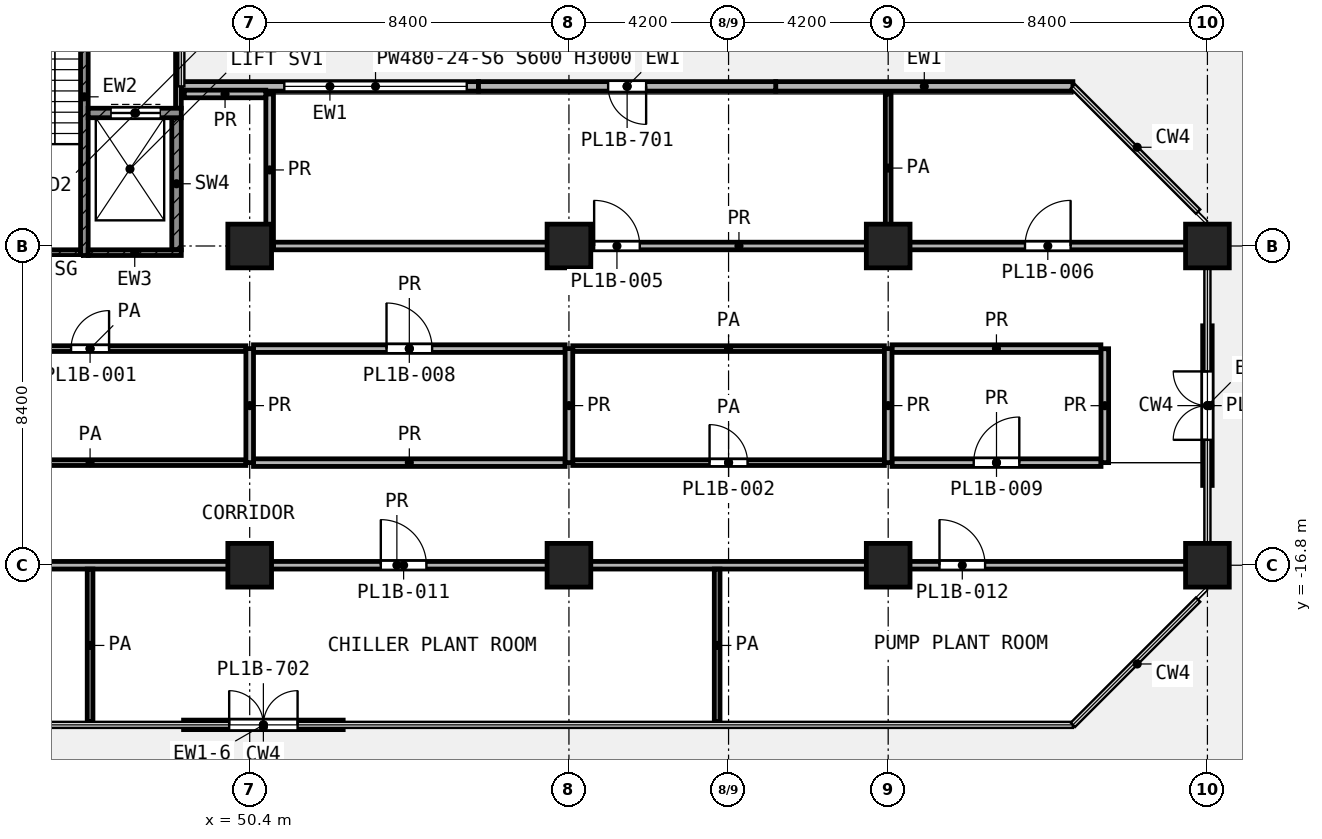
"""IFC4 building model, lengths in metres.
Left out: names, types, materials, properties, quantities, classifications, styles, units other than length and angle.
Written with IfcOpenShell. Run it as: python <this file> out.ifc"""

import sys

from ifc_helpers import new_model, si_unit, direction, frame, frame_2d, origin, origin_2d, place, context, subcontext, project, spatial, rectangle, extrude, element, fill, save


model = new_model("IFC4")
c1 = context("Model", 3, precision=1e-05, world=origin(), true_north=direction((0.0, 1.0)))
c2 = subcontext(c1, "Body", "Model", "MODEL_VIEW")
j1 = project(units=[si_unit("LENGTHUNIT", "METRE"), si_unit("PLANEANGLEUNIT", "RADIAN")], contexts=[c1])
p1 = place(None, origin())
s1 = spatial("IfcSite", under=j1, at=p1, CompositionType="ELEMENT")
p2 = place(p1, origin())
s2 = spatial("IfcBuilding", under=s1, at=p2, CompositionType="ELEMENT")
p3 = place(p2, frame((0.0, 0.0, 93.8)))
s3 = spatial("IfcBuildingStorey", under=s2, at=p3, CompositionType="ELEMENT", Elevation=93.8)
for number, where, z_axis, x_axis in (
    (1, (50.4, -8.4, 0.0), (0.0, 0.0, 1.0), (1.0, 0.0, 0.0)),
    (2, (58.8, -8.4, 0.0), (0.0, 0.0, 1.0), (1.0, 0.0, 0.0)),
    (3, (67.2, -8.4, 0.0), (0.0, 0.0, 1.0), (1.0, 0.0, 0.0)),
    (4, (75.6, -8.4, 0.0), (0.0, 0.0, 1.0), (1.0, 0.0, 0.0)),
    (5, (50.4, -16.8, 0.0), (0.0, 0.0, 1.0), (1.0, 0.0, 0.0)),
    (6, (58.8, -16.8, 0.0), (0.0, 0.0, 1.0), (1.0, 0.0, 0.0)),
    (7, (67.2, -16.8, 0.0), (0.0, 0.0, 1.0), (1.0, 0.0, 0.0)),
    (8, (75.6, -16.8, 0.0), (0.0, 0.0, 1.0), (1.0, 0.0, 0.0)),
):
    element("IfcColumn", number, at=place(p3, frame(where, z_axis=z_axis, x_axis=x_axis)), inside=s3, PredefinedType="COLUMN", context=c2, shape_type="SweptSolid", body=[
        extrude(rectangle(XDim=1.15, YDim=1.15, at=origin_2d()), origin(), (0.0, 0.0, 1.0), 5.0),
    ])
p4 = place(p3, frame((48.66, -21.0, 0.0), z_axis=(0.0, 0.0, 1.0), x_axis=(1.0, 0.0, 0.0)))
e9 = element("IfcWall", 9, at=p4, inside=s3, PredefinedType="SOLIDWALL", context=c2, shape_type="SweptSolid", body=[
    extrude(rectangle(XDim=4.2, YDim=0.25, at=frame_2d((2.1, 0.0))), origin(), (0.0, 0.0, 1.0), 4.24),
])
p5 = place(p4, frame((1.2, 0.0, 0.0)))
e10 = element("IfcOpeningElement", 10, at=p5, cuts=e9, PredefinedType="OPENING", context=c2, shape_type="SweptSolid", body=[
    extrude(rectangle(XDim=1.8, YDim=2.1, at=frame_2d((0.9, 1.05))), frame((0.0, 0.135, 0.0), z_axis=(0.0, -1.0, 0.0), x_axis=(1.0, 0.0, 0.0)), (0.0, 0.0, 1.0), 0.27),
])
p6 = place(p3, frame((75.6, -14.7, 0.0), z_axis=(0.0, 0.0, 1.0), x_axis=(0.0, 1.0, 0.0)))
e11 = element("IfcWall", 11, at=p6, inside=s3, PredefinedType="SOLIDWALL", context=c2, shape_type="SweptSolid", body=[
    extrude(rectangle(XDim=4.2, YDim=0.25, at=frame_2d((2.1, 0.0))), origin(), (0.0, 0.0, 1.0), 4.24),
])
p7 = place(p6, frame((1.2, 0.0, 0.0)))
e12 = element("IfcOpeningElement", 12, at=p7, cuts=e11, PredefinedType="OPENING", context=c2, shape_type="SweptSolid", body=[
    extrude(rectangle(XDim=1.8, YDim=2.1, at=frame_2d((0.9, 1.05))), frame((0.0, 0.135, 0.0), z_axis=(0.0, -1.0, 0.0), x_axis=(1.0, 0.0, 0.0)), (0.0, 0.0, 1.0), 0.27),
])
p8 = place(p3, frame((72.06, -4.2, 0.0), z_axis=(0.0, 0.0, 1.0), x_axis=(-1.0, 0.0, 0.0)))
e13 = element("IfcWall", 13, at=p8, inside=s3, PredefinedType="SOLIDWALL", context=c2, shape_type="SweptSolid", body=[
    extrude(rectangle(XDim=7.82, YDim=0.25, at=frame_2d((3.91, 0.0))), origin(), (0.0, 0.0, 1.0), 4.4),
])
p9 = place(p3, frame((64.24, -4.2, 0.0), z_axis=(0.0, 0.0, 1.0), x_axis=(-1.0, 0.0, 0.0)))
e14 = element("IfcWall", 14, at=p9, inside=s3, PredefinedType="SOLIDWALL", context=c2, shape_type="SweptSolid", body=[
    extrude(rectangle(XDim=7.82, YDim=0.25, at=frame_2d((3.91, 0.0))), origin(), (0.0, 0.0, 1.0), 4.4),
])
p10 = place(p9, frame((3.409, 0.0, 0.0)))
e15 = element("IfcOpeningElement", 15, at=p10, cuts=e14, PredefinedType="OPENING", context=c2, shape_type="SweptSolid", body=[
    extrude(rectangle(XDim=1.0, YDim=2.1, at=frame_2d((0.5, 1.05))), frame((0.0, 0.135, 0.0), z_axis=(0.0, -1.0, 0.0), x_axis=(1.0, 0.0, 0.0)), (0.0, 0.0, 1.0), 0.27),
])
p11 = place(p3, frame((56.421, -4.2, 0.0), z_axis=(0.0, 0.0, 1.0), x_axis=(-1.0, 0.0, 0.0)))
e16 = element("IfcWall", 16, at=p11, inside=s3, PredefinedType="SOLIDWALL", context=c2, shape_type="SweptSolid", body=[
    extrude(rectangle(XDim=7.82, YDim=0.25, at=frame_2d((3.91, 0.0))), origin(), (0.0, 0.0, 1.0), 4.4),
])
p12 = place(p11, frame((0.31, 0.0, 0.6)))
e17 = element("IfcOpeningElement", 17, at=p12, cuts=e16, PredefinedType="OPENING", context=c2, shape_type="SweptSolid", body=[
    extrude(rectangle(XDim=4.8, YDim=2.4, at=frame_2d((2.4, 1.2))), frame((0.0, 0.135, 0.0), z_axis=(0.0, -1.0, 0.0), x_axis=(1.0, 0.0, 0.0)), (0.0, 0.0, 1.0), 0.27),
])
p13 = place(p3, frame((46.05, -8.65, 0.0), z_axis=(0.0, 0.0, 1.0), x_axis=(0.0, 1.0, 0.0)))
e18 = element("IfcWall", 18, at=p13, inside=s3, PredefinedType="SHEAR", context=c2, shape_type="SweptSolid", body=[
    extrude(rectangle(XDim=8.35, YDim=0.2, at=frame_2d((4.175, 0.0))), origin(), (0.0, 0.0, 1.0), 4.4),
])
p14 = place(p13, frame((7.0, 0.0, 0.0)))
e19 = element("IfcOpeningElement", 19, at=p14, cuts=e18, PredefinedType="OPENING", context=c2, shape_type="SweptSolid", body=[
    extrude(rectangle(XDim=1.1, YDim=2.1, at=frame_2d((0.55, 1.05))), frame((0.0, 0.11, 0.0), z_axis=(0.0, -1.0, 0.0), x_axis=(1.0, 0.0, 0.0)), (0.0, 0.0, 1.0), 0.22),
])
p15 = place(p3, frame((43.1, -8.575, 0.0), z_axis=(0.0, 0.0, 1.0), x_axis=(1.0, 0.0, 0.0)))
e20 = element("IfcWall", 20, at=p15, inside=s3, PredefinedType="SHEAR", context=c2, shape_type="SweptSolid", body=[
    extrude(rectangle(XDim=2.85, YDim=0.15, at=frame_2d((1.425, 0.0))), origin(), (0.0, 0.0, 1.0), 4.4),
])
p16 = place(p3, frame((46.15, -8.575, 0.0), z_axis=(0.0, 0.0, 1.0), x_axis=(1.0, 0.0, 0.0)))
e21 = element("IfcWall", 21, at=p16, inside=s3, PredefinedType="SHEAR", context=c2, shape_type="SweptSolid", body=[
    extrude(rectangle(XDim=2.45, YDim=0.15, at=frame_2d((1.225, 0.0))), origin(), (0.0, 0.0, 1.0), 4.4),
])
p17 = place(p3, frame((46.15, -4.9, 0.0), z_axis=(0.0, 0.0, 1.0), x_axis=(1.0, 0.0, 0.0)))
e22 = element("IfcWall", 22, at=p17, inside=s3, PredefinedType="SHEAR", context=c2, shape_type="SweptSolid", body=[
    extrude(rectangle(XDim=2.45, YDim=0.25, at=frame_2d((1.225, 0.0))), origin(), (0.0, 0.0, 1.0), 4.4),
])
p18 = place(p17, frame((0.6, 0.0, 0.0)))
e23 = element("IfcOpeningElement", 23, at=p18, cuts=e22, PredefinedType="OPENING", context=c2, shape_type="SweptSolid", body=[
    extrude(rectangle(XDim=1.3, YDim=2.1, at=frame_2d((0.65, 1.05))), frame((0.0, 0.135, 0.0), z_axis=(0.0, -1.0, 0.0), x_axis=(1.0, 0.0, 0.0)), (0.0, 0.0, 1.0), 0.27),
])
p19 = place(p3, frame((48.475, -8.5, 0.0), z_axis=(0.0, 0.0, 1.0), x_axis=(0.0, 1.0, 0.0)))
e24 = element("IfcWall", 24, at=p19, inside=s3, PredefinedType="SHEAR", context=c2, shape_type="SweptSolid", body=[
    extrude(rectangle(XDim=3.475, YDim=0.25, at=frame_2d((1.738, 0.0))), origin(), (0.0, 0.0, 1.0), 4.4),
])
p20 = place(p3, frame((48.525, -4.775, 0.0), z_axis=(0.0, 0.0, 1.0), x_axis=(0.0, 1.0, 0.0)))
e25 = element("IfcWall", 25, at=p20, inside=s3, PredefinedType="PARTITIONING", context=c2, shape_type="SweptSolid", body=[
    extrude(rectangle(XDim=4.325, YDim=0.15, at=frame_2d((2.163, 0.0))), origin(), (0.0, 0.0, 1.0), 4.4),
])
p21 = place(p20, frame((1.625, 0.0, 0.0)))
e26 = element("IfcOpeningElement", 26, at=p21, cuts=e25, PredefinedType="OPENING", context=c2, shape_type="SweptSolid", body=[
    extrude(rectangle(XDim=1.1, YDim=2.1, at=frame_2d((0.55, 1.05))), frame((0.0, 0.085, 0.0), z_axis=(0.0, -1.0, 0.0), x_axis=(1.0, 0.0, 0.0)), (0.0, 0.0, 1.0), 0.17),
])
p22 = place(p3, frame((42.1, -14.1, 0.0), z_axis=(0.0, 0.0, 1.0), x_axis=(1.0, 0.0, 0.0)))
e27 = element("IfcWall", 27, at=p22, inside=s3, PredefinedType="PARTITIONING", context=c2, shape_type="SweptSolid", body=[
    extrude(rectangle(XDim=8.2, YDim=0.15, at=frame_2d((4.1, 0.0))), origin(), (0.0, 0.0, 1.0), 4.4),
])
p23 = place(p3, frame((58.9, -14.1, 0.0), z_axis=(0.0, 0.0, 1.0), x_axis=(1.0, 0.0, 0.0)))
e28 = element("IfcWall", 28, at=p23, inside=s3, PredefinedType="PARTITIONING", context=c2, shape_type="SweptSolid", body=[
    extrude(rectangle(XDim=8.2, YDim=0.15, at=frame_2d((4.1, 0.0))), origin(), (0.0, 0.0, 1.0), 4.4),
])
p24 = place(p23, frame((3.6, 0.0, 0.0)))
e29 = element("IfcOpeningElement", 29, at=p24, cuts=e28, PredefinedType="OPENING", context=c2, shape_type="SweptSolid", body=[
    extrude(rectangle(XDim=1.0, YDim=2.1, at=frame_2d((0.5, 1.05))), frame((0.0, 0.085, 0.0), z_axis=(0.0, -1.0, 0.0), x_axis=(1.0, 0.0, 0.0)), (0.0, 0.0, 1.0), 0.17),
])
p25 = place(p3, frame((42.1, -11.1, 0.0), z_axis=(0.0, 0.0, 1.0), x_axis=(1.0, 0.0, 0.0)))
e30 = element("IfcWall", 30, at=p25, inside=s3, PredefinedType="PARTITIONING", context=c2, shape_type="SweptSolid", body=[
    extrude(rectangle(XDim=8.2, YDim=0.15, at=frame_2d((4.1, 0.0))), origin(), (0.0, 0.0, 1.0), 4.4),
])
p26 = place(p25, frame((3.6, 0.0, 0.0)))
e31 = element("IfcOpeningElement", 31, at=p26, cuts=e30, PredefinedType="OPENING", context=c2, shape_type="SweptSolid", body=[
    extrude(rectangle(XDim=1.0, YDim=2.1, at=frame_2d((0.5, 1.05))), frame((0.0, 0.085, 0.0), z_axis=(0.0, -1.0, 0.0), x_axis=(1.0, 0.0, 0.0)), (0.0, 0.0, 1.0), 0.17),
])
p27 = place(p3, frame((58.9, -11.1, 0.0), z_axis=(0.0, 0.0, 1.0), x_axis=(1.0, 0.0, 0.0)))
e32 = element("IfcWall", 32, at=p27, inside=s3, PredefinedType="PARTITIONING", context=c2, shape_type="SweptSolid", body=[
    extrude(rectangle(XDim=8.2, YDim=0.15, at=frame_2d((4.1, 0.0))), origin(), (0.0, 0.0, 1.0), 4.4),
])
for number, where, z_axis, x_axis in (
    (33, (46.2, -20.92, 0.0), (0.0, 0.0, 1.0), (0.0, 1.0, 0.0)),
    (34, (62.7, -20.92, 0.0), (0.0, 0.0, 1.0), (0.0, 1.0, 0.0)),
):
    element("IfcWall", number, at=place(p3, frame(where, z_axis=z_axis, x_axis=x_axis)), inside=s3, PredefinedType="PARTITIONING", context=c2, shape_type="SweptSolid", body=[
        extrude(rectangle(XDim=4.02, YDim=0.15, at=frame_2d((2.01, 0.0))), origin(), (0.0, 0.0, 1.0), 4.4),
    ])
p28 = place(p3, frame((67.2, -8.3, 0.0), z_axis=(0.0, 0.0, 1.0), x_axis=(0.0, 1.0, 0.0)))
e35 = element("IfcWall", 35, at=p28, inside=s3, PredefinedType="PARTITIONING", context=c2, shape_type="SweptSolid", body=[
    extrude(rectangle(XDim=3.9, YDim=0.15, at=frame_2d((1.95, 0.0))), origin(), (0.0, 0.0, 1.0), 4.4),
])
p29 = place(p3, frame((33.025, -16.8, 0.0), z_axis=(0.0, 0.0, 1.0), x_axis=(1.0, 0.0, 0.0)))
e36 = element("IfcWall", 36, at=p29, inside=s3, PredefinedType="PARTITIONING", context=c2, shape_type="SweptSolid", body=[
    extrude(rectangle(XDim=42.495, YDim=0.2, at=frame_2d((21.248, 0.0))), origin(), (0.0, 0.0, 1.0), 4.4),
])
p30 = place(p29, frame((2.075, 0.0, 0.0)))
e37 = element("IfcOpeningElement", 37, at=p30, cuts=e36, PredefinedType="OPENING", context=c2, shape_type="SweptSolid", body=[
    extrude(rectangle(XDim=1.2, YDim=2.1, at=frame_2d((0.6, 1.05))), frame((0.0, 0.11, 0.0), z_axis=(0.0, -1.0, 0.0), x_axis=(1.0, 0.0, 0.0)), (0.0, 0.0, 1.0), 0.22),
])
p31 = place(p29, frame((20.825, 0.0, 0.0)))
e38 = element("IfcOpeningElement", 38, at=p31, cuts=e36, PredefinedType="OPENING", context=c2, shape_type="SweptSolid", body=[
    extrude(rectangle(XDim=1.2, YDim=2.1, at=frame_2d((0.6, 1.05))), frame((0.0, 0.11, 0.0), z_axis=(0.0, -1.0, 0.0), x_axis=(1.0, 0.0, 0.0)), (0.0, 0.0, 1.0), 0.22),
])
p32 = place(p29, frame((35.525, 0.0, 0.0)))
e39 = element("IfcOpeningElement", 39, at=p32, cuts=e36, PredefinedType="OPENING", context=c2, shape_type="SweptSolid", body=[
    extrude(rectangle(XDim=1.2, YDim=2.1, at=frame_2d((0.6, 1.05))), frame((0.0, 0.11, 0.0), z_axis=(0.0, -1.0, 0.0), x_axis=(1.0, 0.0, 0.0)), (0.0, 0.0, 1.0), 0.22),
])
p33 = place(p3, frame((50.5, -14.1, 0.0), z_axis=(0.0, 0.0, 1.0), x_axis=(1.0, 0.0, 0.0)))
e40 = element("IfcWall", 40, at=p33, inside=s3, PredefinedType="PARTITIONING", context=c2, shape_type="SweptSolid", body=[
    extrude(rectangle(XDim=8.2, YDim=0.2, at=frame_2d((4.1, 0.0))), origin(), (0.0, 0.0, 1.0), 4.4),
])
p34 = place(p3, frame((67.3, -14.1, 0.0), z_axis=(0.0, 0.0, 1.0), x_axis=(1.0, 0.0, 0.0)))
e41 = element("IfcWall", 41, at=p34, inside=s3, PredefinedType="PARTITIONING", context=c2, shape_type="SweptSolid", body=[
    extrude(rectangle(XDim=5.5, YDim=0.2, at=frame_2d((2.75, 0.0))), origin(), (0.0, 0.0, 1.0), 4.4),
])
p35 = place(p34, frame((2.15, 0.0, 0.0)))
e42 = element("IfcOpeningElement", 42, at=p35, cuts=e41, PredefinedType="OPENING", context=c2, shape_type="SweptSolid", body=[
    extrude(rectangle(XDim=1.2, YDim=2.1, at=frame_2d((0.6, 1.05))), frame((0.0, 0.11, 0.0), z_axis=(0.0, -1.0, 0.0), x_axis=(1.0, 0.0, 0.0)), (0.0, 0.0, 1.0), 0.22),
])
p36 = place(p3, frame((50.5, -11.1, 0.0), z_axis=(0.0, 0.0, 1.0), x_axis=(1.0, 0.0, 0.0)))
e43 = element("IfcWall", 43, at=p36, inside=s3, PredefinedType="PARTITIONING", context=c2, shape_type="SweptSolid", body=[
    extrude(rectangle(XDim=8.2, YDim=0.2, at=frame_2d((4.1, 0.0))), origin(), (0.0, 0.0, 1.0), 4.4),
])
p37 = place(p36, frame((3.5, 0.0, 0.0)))
e44 = element("IfcOpeningElement", 44, at=p37, cuts=e43, PredefinedType="OPENING", context=c2, shape_type="SweptSolid", body=[
    extrude(rectangle(XDim=1.2, YDim=2.1, at=frame_2d((0.6, 1.05))), frame((0.0, 0.11, 0.0), z_axis=(0.0, -1.0, 0.0), x_axis=(1.0, 0.0, 0.0)), (0.0, 0.0, 1.0), 0.22),
])
p38 = place(p3, frame((67.3, -11.1, 0.0), z_axis=(0.0, 0.0, 1.0), x_axis=(1.0, 0.0, 0.0)))
e45 = element("IfcWall", 45, at=p38, inside=s3, PredefinedType="PARTITIONING", context=c2, shape_type="SweptSolid", body=[
    extrude(rectangle(XDim=5.497, YDim=0.2, at=frame_2d((2.749, 0.0))), origin(), (0.0, 0.0, 1.0), 4.4),
])
p39 = place(p3, frame((51.027, -8.4, 0.0), z_axis=(0.0, 0.0, 1.0), x_axis=(1.0, 0.0, 0.0)))
e46 = element("IfcWall", 46, at=p39, inside=s3, PredefinedType="PARTITIONING", context=c2, shape_type="SweptSolid", body=[
    extrude(rectangle(XDim=24.493, YDim=0.2, at=frame_2d((12.247, 0.0))), origin(), (0.0, 0.0, 1.0), 4.4),
])
p40 = place(p39, frame((8.436, 0.0, 0.0)))
e47 = element("IfcOpeningElement", 47, at=p40, cuts=e46, PredefinedType="OPENING", context=c2, shape_type="SweptSolid", body=[
    extrude(rectangle(XDim=1.2, YDim=2.1, at=frame_2d((0.6, 1.05))), frame((0.0, 0.11, 0.0), z_axis=(0.0, -1.0, 0.0), x_axis=(1.0, 0.0, 0.0)), (0.0, 0.0, 1.0), 0.22),
])
p41 = place(p39, frame((19.773, 0.0, 0.0)))
e48 = element("IfcOpeningElement", 48, at=p41, cuts=e46, PredefinedType="OPENING", context=c2, shape_type="SweptSolid", body=[
    extrude(rectangle(XDim=1.2, YDim=2.1, at=frame_2d((0.6, 1.05))), frame((0.0, 0.11, 0.0), z_axis=(0.0, -1.0, 0.0), x_axis=(1.0, 0.0, 0.0)), (0.0, 0.0, 1.0), 0.22),
])
p42 = place(p3, frame((48.68, -4.4, 0.0), z_axis=(0.0, 0.0, 1.0), x_axis=(1.0, 0.0, 0.0)))
e49 = element("IfcWall", 49, at=p42, inside=s3, PredefinedType="PARTITIONING", context=c2, shape_type="SweptSolid", body=[
    extrude(rectangle(XDim=2.143, YDim=0.2, at=frame_2d((1.072, 0.0))), origin(), (0.0, 0.0, 1.0), 4.4),
])
p43 = place(p3, frame((50.4, -14.1, 0.0), z_axis=(0.0, 0.0, 1.0), x_axis=(0.0, 1.0, 0.0)))
e50 = element("IfcWall", 50, at=p43, inside=s3, PredefinedType="PARTITIONING", context=c2, shape_type="SweptSolid", body=[
    extrude(rectangle(XDim=3.0, YDim=0.2, at=frame_2d((1.5, 0.0))), origin(), (0.0, 0.0, 1.0), 4.4),
])
p44 = place(p3, frame((50.925, -8.397, 0.0), z_axis=(0.0, 0.0, 1.0), x_axis=(0.0, 1.0, 0.0)))
e51 = element("IfcWall", 51, at=p44, inside=s3, PredefinedType="PARTITIONING", context=c2, shape_type="SweptSolid", body=[
    extrude(rectangle(XDim=3.996, YDim=0.2, at=frame_2d((1.998, 0.0))), origin(), (0.0, 0.0, 1.0), 4.4),
])
for number, where, z_axis, x_axis in (
    (52, (58.8, -14.1, 0.0), (0.0, 0.0, 1.0), (0.0, 1.0, 0.0)),
    (53, (67.2, -14.1, 0.0), (0.0, 0.0, 1.0), (0.0, 1.0, 0.0)),
):
    element("IfcWall", number, at=place(p3, frame(where, z_axis=z_axis, x_axis=x_axis)), inside=s3, PredefinedType="PARTITIONING", context=c2, shape_type="SweptSolid", body=[
        extrude(rectangle(XDim=3.0, YDim=0.2, at=frame_2d((1.5, 0.0))), origin(), (0.0, 0.0, 1.0), 4.4),
    ])
p45 = place(p3, frame((72.9, -14.1, 0.0), z_axis=(0.0, 0.0, 1.0), x_axis=(0.0, 1.0, 0.0)))
e54 = element("IfcWall", 54, at=p45, inside=s3, PredefinedType="PARTITIONING", context=c2, shape_type="SweptSolid", body=[
    extrude(rectangle(XDim=2.997, YDim=0.2, at=frame_2d((1.499, 0.0))), origin(), (0.0, 0.0, 1.0), 4.4),
])
p46 = place(p5, origin())
e55 = element("IfcDoor", 55, at=p46, inside=s3, OperationType="DOUBLE_DOOR_SINGLE_SWING", PredefinedType="DOOR", context=c2, shape_type="SweptSolid", body=[
    extrude(rectangle(XDim=1.8, YDim=2.1, at=frame_2d((0.9, 1.05))), frame((0.0, 0.025, 0.0), z_axis=(0.0, -1.0, 0.0), x_axis=(1.0, 0.0, 0.0)), (0.0, 0.0, 1.0), 0.05),
])
fill(e10, e55)
p47 = place(p7, origin())
e56 = element("IfcDoor", 56, at=p47, inside=s3, OperationType="DOUBLE_DOOR_SINGLE_SWING", PredefinedType="DOOR", context=c2, shape_type="SweptSolid", body=[
    extrude(rectangle(XDim=1.8, YDim=2.1, at=frame_2d((0.9, 1.05))), frame((0.0, 0.025, 0.0), z_axis=(0.0, -1.0, 0.0), x_axis=(1.0, 0.0, 0.0)), (0.0, 0.0, 1.0), 0.05),
])
fill(e12, e56)
p48 = place(p10, origin())
e57 = element("IfcDoor", 57, at=p48, inside=s3, OperationType="SINGLE_SWING_LEFT", PredefinedType="DOOR", context=c2, shape_type="SweptSolid", body=[
    extrude(rectangle(XDim=1.0, YDim=2.1, at=frame_2d((0.5, 1.05))), frame((0.0, 0.025, 0.0), z_axis=(0.0, -1.0, 0.0), x_axis=(1.0, 0.0, 0.0)), (0.0, 0.0, 1.0), 0.05),
])
fill(e15, e57)
p49 = place(p12, origin())
e58 = element("IfcWindow", 58, at=p49, inside=s3, PartitioningType="SINGLE_PANEL", PredefinedType="WINDOW", context=c2, shape_type="SweptSolid", body=[
    extrude(rectangle(XDim=4.8, YDim=2.4, at=frame_2d((2.4, 1.2))), frame((0.0, 0.03, 0.0), z_axis=(0.0, -1.0, 0.0), x_axis=(1.0, 0.0, 0.0)), (0.0, 0.0, 1.0), 0.06),
])
fill(e17, e58)
p50 = place(p18, origin())
e59 = element("IfcDoor", 59, at=p50, inside=s3, OperationType="DOUBLE_DOOR_SLIDING", PredefinedType="DOOR", context=c2, shape_type="SweptSolid", body=[
    extrude(rectangle(XDim=1.3, YDim=2.1, at=frame_2d((0.65, 1.05))), frame((0.0, 0.025, 0.0), z_axis=(0.0, -1.0, 0.0), x_axis=(1.0, 0.0, 0.0)), (0.0, 0.0, 1.0), 0.05),
])
fill(e23, e59)
p51 = place(p40, origin())
e60 = element("IfcDoor", 60, at=p51, inside=s3, OperationType="SINGLE_SWING_LEFT", PredefinedType="DOOR", context=c2, shape_type="SweptSolid", body=[
    extrude(rectangle(XDim=1.2, YDim=2.1, at=frame_2d((0.6, 1.05))), frame((0.0, 0.025, 0.0), z_axis=(0.0, -1.0, 0.0), x_axis=(1.0, 0.0, 0.0)), (0.0, 0.0, 1.0), 0.05),
])
fill(e47, e60)
p52 = place(p41, origin())
e61 = element("IfcDoor", 61, at=p52, inside=s3, OperationType="SINGLE_SWING_RIGHT", PredefinedType="DOOR", context=c2, shape_type="SweptSolid", body=[
    extrude(rectangle(XDim=1.2, YDim=2.1, at=frame_2d((0.6, 1.05))), frame((0.0, 0.025, 0.0), z_axis=(0.0, -1.0, 0.0), x_axis=(1.0, 0.0, 0.0)), (0.0, 0.0, 1.0), 0.05),
])
fill(e48, e61)
p53 = place(p26, origin())
e62 = element("IfcDoor", 62, at=p53, inside=s3, OperationType="SINGLE_SWING_RIGHT", PredefinedType="DOOR", context=c2, shape_type="SweptSolid", body=[
    extrude(rectangle(XDim=1.0, YDim=2.1, at=frame_2d((0.5, 1.05))), frame((0.0, 0.025, 0.0), z_axis=(0.0, -1.0, 0.0), x_axis=(1.0, 0.0, 0.0)), (0.0, 0.0, 1.0), 0.05),
])
fill(e31, e62)
p54 = place(p37, origin())
e63 = element("IfcDoor", 63, at=p54, inside=s3, OperationType="SINGLE_SWING_LEFT", PredefinedType="DOOR", context=c2, shape_type="SweptSolid", body=[
    extrude(rectangle(XDim=1.2, YDim=2.1, at=frame_2d((0.6, 1.05))), frame((0.0, 0.025, 0.0), z_axis=(0.0, -1.0, 0.0), x_axis=(1.0, 0.0, 0.0)), (0.0, 0.0, 1.0), 0.05),
])
fill(e44, e63)
p55 = place(p24, origin())
e64 = element("IfcDoor", 64, at=p55, inside=s3, OperationType="SINGLE_SWING_LEFT", PredefinedType="DOOR", context=c2, shape_type="SweptSolid", body=[
    extrude(rectangle(XDim=1.0, YDim=2.1, at=frame_2d((0.5, 1.05))), frame((0.0, 0.025, 0.0), z_axis=(0.0, -1.0, 0.0), x_axis=(1.0, 0.0, 0.0)), (0.0, 0.0, 1.0), 0.05),
])
fill(e29, e64)
p56 = place(p35, origin())
e65 = element("IfcDoor", 65, at=p56, inside=s3, OperationType="SINGLE_SWING_RIGHT", PredefinedType="DOOR", context=c2, shape_type="SweptSolid", body=[
    extrude(rectangle(XDim=1.2, YDim=2.1, at=frame_2d((0.6, 1.05))), frame((0.0, 0.025, 0.0), z_axis=(0.0, -1.0, 0.0), x_axis=(1.0, 0.0, 0.0)), (0.0, 0.0, 1.0), 0.05),
])
fill(e42, e65)
p57 = place(p31, origin())
e66 = element("IfcDoor", 66, at=p57, inside=s3, OperationType="SINGLE_SWING_LEFT", PredefinedType="DOOR", context=c2, shape_type="SweptSolid", body=[
    extrude(rectangle(XDim=1.2, YDim=2.1, at=frame_2d((0.6, 1.05))), frame((0.0, 0.025, 0.0), z_axis=(0.0, -1.0, 0.0), x_axis=(1.0, 0.0, 0.0)), (0.0, 0.0, 1.0), 0.05),
])
fill(e38, e66)
p58 = place(p32, origin())
e67 = element("IfcDoor", 67, at=p58, inside=s3, OperationType="SINGLE_SWING_LEFT", PredefinedType="DOOR", context=c2, shape_type="SweptSolid", body=[
    extrude(rectangle(XDim=1.2, YDim=2.1, at=frame_2d((0.6, 1.05))), frame((0.0, 0.025, 0.0), z_axis=(0.0, -1.0, 0.0), x_axis=(1.0, 0.0, 0.0)), (0.0, 0.0, 1.0), 0.05),
])
fill(e39, e67)
save(model, sys.argv[1])
